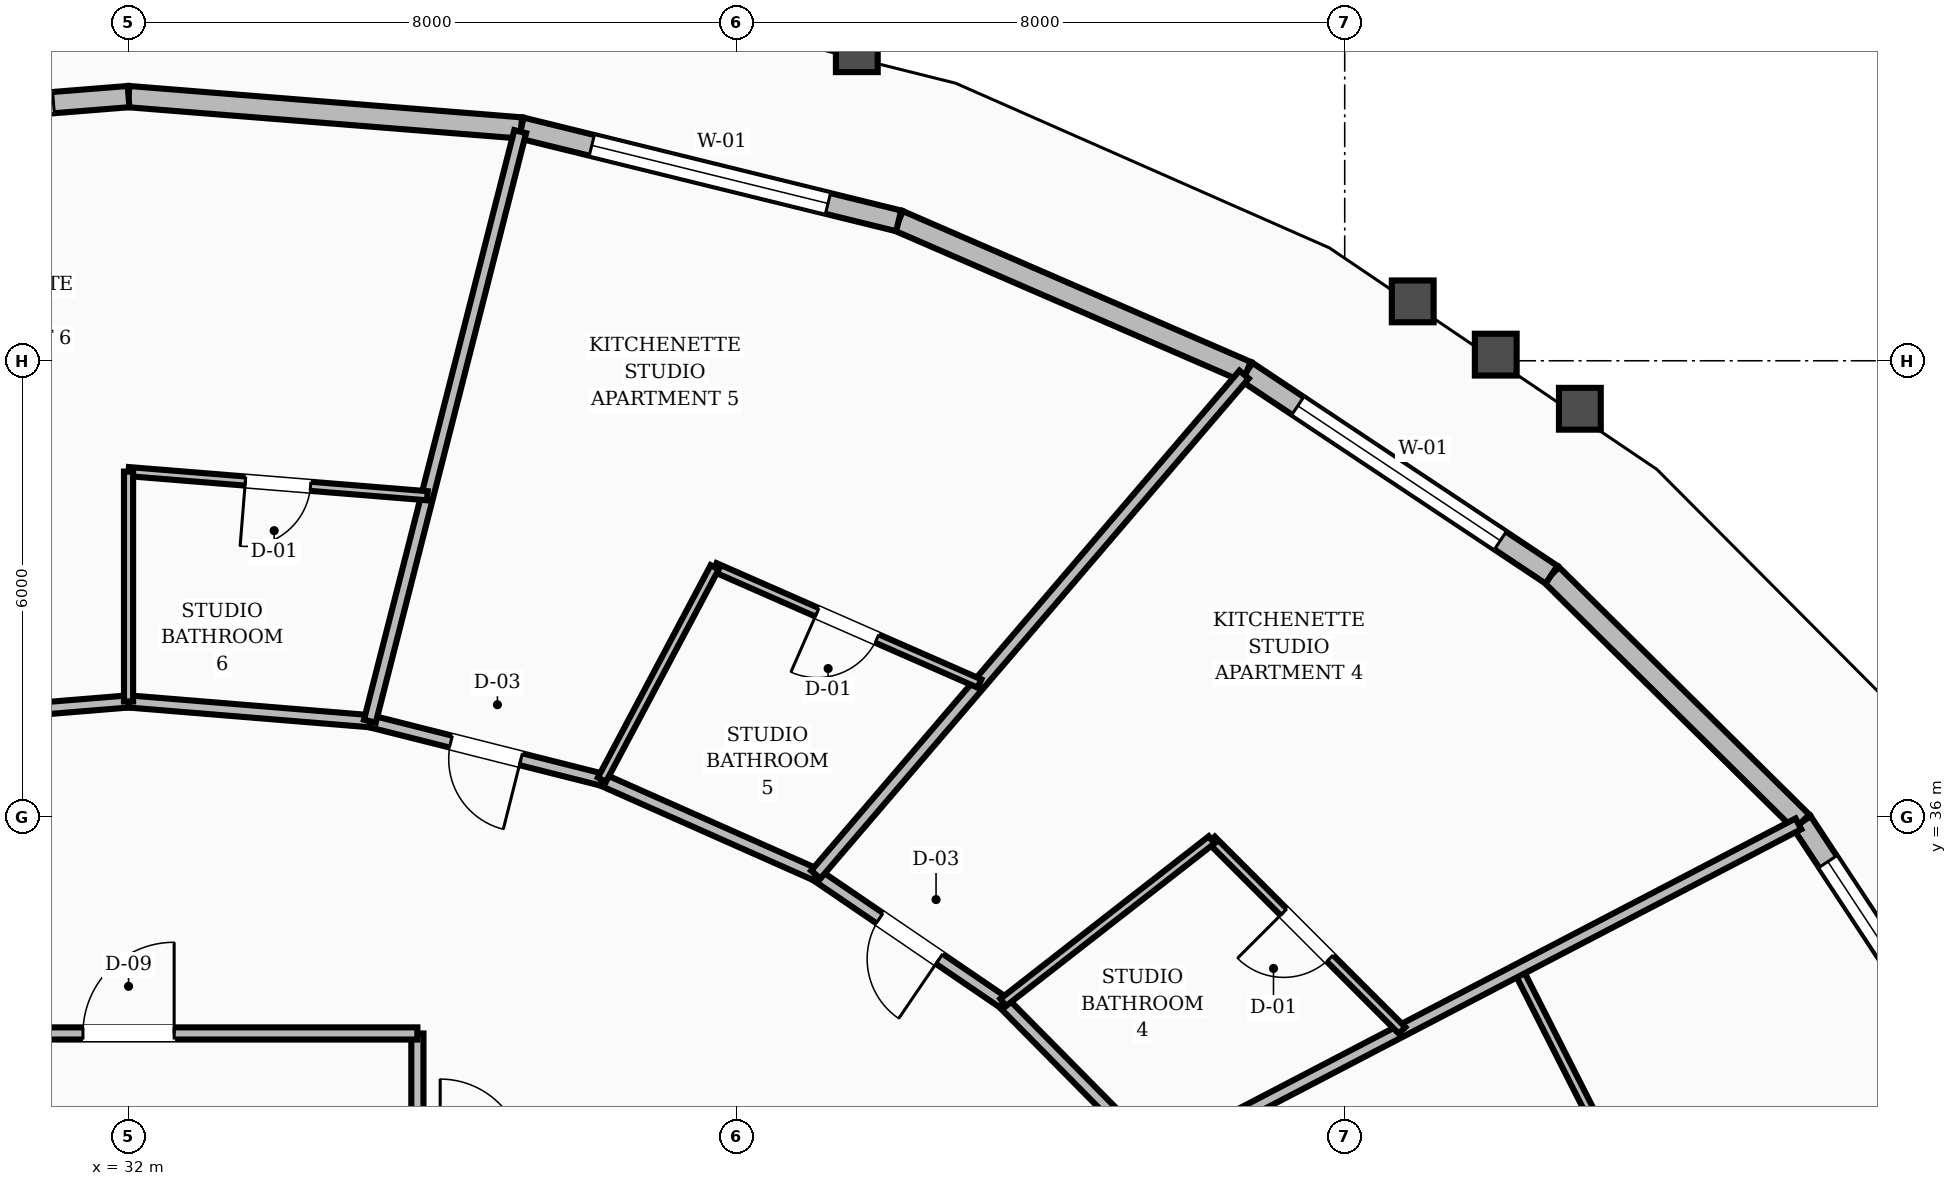
"""IFC4 building model, lengths in metres.
Left out: names, types, materials, properties, quantities, classifications, styles, units other than length and angle.
Written with IfcOpenShell. Run it as: python <this file> out.ifc"""

import sys

from ifc_helpers import new_model, si_unit, direction, frame, frame_2d, origin, place, context, subcontext, project, spatial, rectangle, extrude, element, fill, save


model = new_model("IFC4")
c1 = context("Model", 3, precision=1e-05, world=origin(), true_north=direction((0.0, 1.0)))
c2 = subcontext(c1, "Body", "Model", "MODEL_VIEW")
j1 = project(units=[si_unit("LENGTHUNIT", "METRE"), si_unit("PLANEANGLEUNIT", "RADIAN")], contexts=[c1])
p1 = place(None, origin())
s1 = spatial("IfcSite", under=j1, at=p1, CompositionType="ELEMENT")
p2 = place(p1, origin())
s2 = spatial("IfcBuilding", under=s1, at=p2, CompositionType="ELEMENT")
p3 = place(p2, frame((0.0, 0.0, 52.0)))
s3 = spatial("IfcBuildingStorey", under=s2, at=p3, CompositionType="ELEMENT", Elevation=52.0)
p4 = place(p3, frame((56.46, 32.218, 0.0), z_axis=(0.0, 0.0, 1.0), x_axis=(-0.550282912527, 0.834978272879, 0.0)))
e1 = element("IfcWall", 1, at=p4, inside=s3, PredefinedType="STANDARD", context=c2, shape_type="SweptSolid", body=[
    extrude(rectangle(XDim=4.446, YDim=0.28, at=frame_2d((2.223, 0.0))), origin(), (0.0, 0.0, 1.0), 2.65),
])
p5 = place(p4, frame((0.623, 0.0, 0.8)))
e2 = element("IfcOpeningElement", 2, at=p5, cuts=e1, PredefinedType="OPENING", context=c2, shape_type="SweptSolid", body=[
    extrude(rectangle(XDim=3.2, YDim=1.65, at=frame_2d((1.6, 0.825))), frame((0.0, 0.15, 0.0), z_axis=(0.0, -1.0, 0.0), x_axis=(1.0, 0.0, 0.0)), (0.0, 0.0, 1.0), 0.3),
])
p6 = place(p3, frame((54.013, 35.931, 0.0), z_axis=(0.0, 0.0, 1.0), x_axis=(-0.711208285642, 0.702981347146, 0.0)))
e3 = element("IfcWall", 3, at=p6, inside=s3, PredefinedType="STANDARD", context=c2, shape_type="SweptSolid", body=[
    extrude(rectangle(XDim=4.629, YDim=0.28, at=frame_2d((2.315, 0.0))), origin(), (0.0, 0.0, 1.0), 2.65),
])
p7 = place(p3, frame((50.721, 39.185, 0.0), z_axis=(0.0, 0.0, 1.0), x_axis=(-0.832431966359, 0.554127261, 0.0)))
e4 = element("IfcWall", 4, at=p7, inside=s3, PredefinedType="STANDARD", context=c2, shape_type="SweptSolid", body=[
    extrude(rectangle(XDim=4.82, YDim=0.28, at=frame_2d((2.41, 0.0))), origin(), (0.0, 0.0, 1.0), 2.65),
])
p8 = place(p7, frame((0.81, 0.0, 0.8)))
e5 = element("IfcOpeningElement", 5, at=p8, cuts=e4, PredefinedType="OPENING", context=c2, shape_type="SweptSolid", body=[
    extrude(rectangle(XDim=3.2, YDim=1.65, at=frame_2d((1.6, 0.825))), frame((0.0, 0.15, 0.0), z_axis=(0.0, -1.0, 0.0), x_axis=(1.0, 0.0, 0.0)), (0.0, 0.0, 1.0), 0.3),
])
p9 = place(p3, frame((46.709, 41.856, 0.0), z_axis=(0.0, 0.0, 1.0), x_axis=(-0.917468716398, 0.397807936612, 0.0)))
e6 = element("IfcWall", 6, at=p9, inside=s3, PredefinedType="STANDARD", context=c2, shape_type="SweptSolid", body=[
    extrude(rectangle(XDim=4.989, YDim=0.28, at=frame_2d((2.494, 0.0))), origin(), (0.0, 0.0, 1.0), 2.65),
])
p10 = place(p3, frame((42.132, 43.841, 0.0), z_axis=(0.0, 0.0, 1.0), x_axis=(-0.971042653892, 0.238906183096, 0.0)))
e7 = element("IfcWall", 7, at=p10, inside=s3, PredefinedType="STANDARD", context=c2, shape_type="SweptSolid", body=[
    extrude(rectangle(XDim=5.115, YDim=0.28, at=frame_2d((2.557, 0.0))), origin(), (0.0, 0.0, 1.0), 2.65),
])
p11 = place(p10, frame((0.957, 0.0, 0.8)))
e8 = element("IfcOpeningElement", 8, at=p11, cuts=e7, PredefinedType="OPENING", context=c2, shape_type="SweptSolid", body=[
    extrude(rectangle(XDim=3.2, YDim=1.65, at=frame_2d((1.6, 0.825))), frame((0.0, 0.15, 0.0), z_axis=(0.0, -1.0, 0.0), x_axis=(1.0, 0.0, 0.0)), (0.0, 0.0, 1.0), 0.3),
])
p12 = place(p3, frame((37.165, 45.062, 0.0), z_axis=(0.0, 0.0, 1.0), x_axis=(-0.996824560501, 0.079629112651, 0.0)))
e9 = element("IfcWall", 9, at=p12, inside=s3, PredefinedType="STANDARD", context=c2, shape_type="SweptSolid", body=[
    extrude(rectangle(XDim=5.181, YDim=0.28, at=frame_2d((2.591, 0.0))), origin(), (0.0, 0.0, 1.0), 2.65),
])
p13 = place(p3, frame((32.0, 45.475, 0.0), z_axis=(0.0, 0.0, 1.0), x_axis=(-0.996824560501, -0.079629112651, 0.0)))
e10 = element("IfcWall", 10, at=p13, inside=s3, PredefinedType="STANDARD", context=c2, shape_type="SweptSolid", body=[
    extrude(rectangle(XDim=5.181, YDim=0.28, at=frame_2d((2.591, 0.0))), origin(), (0.0, 0.0, 1.0), 2.65),
])
p14 = place(p13, frame((0.991, 0.0, 0.8)))
e11 = element("IfcOpeningElement", 11, at=p14, cuts=e10, PredefinedType="OPENING", context=c2, shape_type="SweptSolid", body=[
    extrude(rectangle(XDim=3.2, YDim=1.65, at=frame_2d((1.6, 0.825))), frame((0.0, 0.15, 0.0), z_axis=(0.0, -1.0, 0.0), x_axis=(1.0, 0.0, 0.0)), (0.0, 0.0, 1.0), 0.3),
])
p15 = place(p3, frame((35.8, 31.45, 0.0), z_axis=(0.0, 0.0, 1.0), x_axis=(0.0, 1.0, 0.0)))
e12 = element("IfcWall", 12, at=p15, inside=s3, PredefinedType="SOLIDWALL", context=c2, shape_type="SweptSolid", body=[
    extrude(rectangle(XDim=1.7, YDim=0.16, at=frame_2d((0.85, 0.0))), origin(), (0.0, 0.0, 1.0), 2.61),
])
p16 = place(p3, frame((28.2, 33.15, 0.0), z_axis=(0.0, 0.0, 1.0), x_axis=(1.0, 0.0, 0.0)))
e13 = element("IfcWall", 13, at=p16, inside=s3, PredefinedType="SOLIDWALL", context=c2, shape_type="SweptSolid", body=[
    extrude(rectangle(XDim=7.6, YDim=0.16, at=frame_2d((3.8, 0.0))), origin(), (0.0, 0.0, 1.0), 2.61),
])
p17 = place(p16, frame((3.2, 0.0, 0.0)))
e14 = element("IfcOpeningElement", 14, at=p17, cuts=e13, PredefinedType="OPENING", context=c2, shape_type="SweptSolid", body=[
    extrude(rectangle(XDim=1.2, YDim=2.1, at=frame_2d((0.6, 1.05))), frame((0.0, 0.09, 0.0), z_axis=(0.0, -1.0, 0.0), x_axis=(1.0, 0.0, 0.0)), (0.0, 0.0, 1.0), 0.18),
])
p18 = place(p3, frame((45.531, 31.51, 0.0), z_axis=(0.0, 0.0, 1.0), x_axis=(-0.702811997, 0.711375636969, 0.0)))
e15 = element("IfcWall", 15, at=p18, inside=s3, PredefinedType="SOLIDWALL", context=c2, shape_type="SweptSolid", body=[
    extrude(rectangle(XDim=2.879, YDim=0.16, at=frame_2d((1.44, 0.0))), origin(), (0.0, 0.0, 1.0), 2.61),
])
p19 = place(p3, frame((43.508, 33.559, 0.0), z_axis=(0.0, 0.0, 1.0), x_axis=(-0.826293096206, 0.56324037423, 0.0)))
e16 = element("IfcWall", 16, at=p19, inside=s3, PredefinedType="SOLIDWALL", context=c2, shape_type="SweptSolid", body=[
    extrude(rectangle(XDim=2.985, YDim=0.16, at=frame_2d((1.492, 0.0))), origin(), (0.0, 0.0, 1.0), 2.61),
])
p20 = place(p19, frame((1.017, 0.0, 0.0)))
e17 = element("IfcOpeningElement", 17, at=p20, cuts=e16, PredefinedType="OPENING", context=c2, shape_type="SweptSolid", body=[
    extrude(rectangle(XDim=0.95, YDim=2.1, at=frame_2d((0.475, 1.05))), frame((0.0, 0.09, 0.0), z_axis=(0.0, -1.0, 0.0), x_axis=(1.0, 0.0, 0.0)), (0.0, 0.0, 1.0), 0.18),
])
p21 = place(p3, frame((41.041, 35.24, 0.0), z_axis=(0.0, 0.0, 1.0), x_axis=(-0.913952123493, 0.405822024984, 0.0)))
e18 = element("IfcWall", 18, at=p21, inside=s3, PredefinedType="SOLIDWALL", context=c2, shape_type="SweptSolid", body=[
    extrude(rectangle(XDim=3.078, YDim=0.16, at=frame_2d((1.539, 0.0))), origin(), (0.0, 0.0, 1.0), 2.61),
])
p22 = place(p3, frame((38.228, 36.489, 0.0), z_axis=(0.0, 0.0, 1.0), x_axis=(-0.969689238064, 0.244341526521, 0.0)))
e19 = element("IfcWall", 19, at=p22, inside=s3, PredefinedType="SOLIDWALL", context=c2, shape_type="SweptSolid", body=[
    extrude(rectangle(XDim=3.148, YDim=0.16, at=frame_2d((1.574, 0.0))), origin(), (0.0, 0.0, 1.0), 2.61),
])
p23 = place(p22, frame((1.099, 0.0, 0.0)))
e20 = element("IfcOpeningElement", 20, at=p23, cuts=e19, PredefinedType="OPENING", context=c2, shape_type="SweptSolid", body=[
    extrude(rectangle(XDim=0.95, YDim=2.1, at=frame_2d((0.475, 1.05))), frame((0.0, 0.09, 0.0), z_axis=(0.0, -1.0, 0.0), x_axis=(1.0, 0.0, 0.0)), (0.0, 0.0, 1.0), 0.18),
])
p24 = place(p3, frame((35.175, 37.258, 0.0), z_axis=(0.0, 0.0, 1.0), x_axis=(-0.996669377538, 0.081548463373, 0.0)))
e21 = element("IfcWall", 21, at=p24, inside=s3, PredefinedType="SOLIDWALL", context=c2, shape_type="SweptSolid", body=[
    extrude(rectangle(XDim=3.185, YDim=0.16, at=frame_2d((1.593, 0.0))), origin(), (0.0, 0.0, 1.0), 2.61),
])
p25 = place(p3, frame((32.0, 37.518, 0.0), z_axis=(0.0, 0.0, 1.0), x_axis=(-0.996669377538, -0.081548463373, 0.0)))
e22 = element("IfcWall", 22, at=p25, inside=s3, PredefinedType="SOLIDWALL", context=c2, shape_type="SweptSolid", body=[
    extrude(rectangle(XDim=3.185, YDim=0.16, at=frame_2d((1.593, 0.0))), origin(), (0.0, 0.0, 1.0), 2.61),
])
p26 = place(p25, frame((1.118, 0.0, 0.0)))
e23 = element("IfcOpeningElement", 23, at=p26, cuts=e22, PredefinedType="OPENING", context=c2, shape_type="SweptSolid", body=[
    extrude(rectangle(XDim=0.95, YDim=2.1, at=frame_2d((0.475, 1.05))), frame((0.0, 0.09, 0.0), z_axis=(0.0, -1.0, 0.0), x_axis=(1.0, 0.0, 0.0)), (0.0, 0.0, 1.0), 0.18),
])
p27 = place(p3, frame((53.564, 27.507, 0.0), z_axis=(0.0, 0.0, 1.0), x_axis=(-0.451980127483, 0.892028006489, 0.0)))
e24 = element("IfcWall", 24, at=p27, inside=s3, PredefinedType="PARTITIONING", context=c2, shape_type="SweptSolid", body=[
    extrude(rectangle(XDim=7.263, YDim=0.12, at=frame_2d((3.632, 0.0))), origin(), (0.0, 0.0, 1.0), 2.61),
])
p28 = place(p27, frame((3.157, 0.0, 0.0)))
e25 = element("IfcOpeningElement", 25, at=p28, cuts=e24, PredefinedType="OPENING", context=c2, shape_type="SweptSolid", body=[
    extrude(rectangle(XDim=0.95, YDim=2.1, at=frame_2d((0.475, 1.05))), frame((0.0, 0.07, 0.0), z_axis=(0.0, -1.0, 0.0), x_axis=(1.0, 0.0, 0.0)), (0.0, 0.0, 1.0), 0.14),
])
p29 = place(p3, frame((45.531, 31.51, 0.0), z_axis=(0.0, 0.0, 1.0), x_axis=(0.886782865133, 0.462186272088, 0.0)))
e26 = element("IfcWall", 26, at=p29, inside=s3, PredefinedType="SOLIDWALL", context=c2, shape_type="SweptSolid", body=[
    extrude(rectangle(XDim=9.515, YDim=0.16, at=frame_2d((4.757, 0.0))), origin(), (0.0, 0.0, 1.0), 2.61),
])
p30 = place(p3, frame((48.754, 33.19, 0.0), z_axis=(0.0, 0.0, 1.0), x_axis=(-0.707003450842, 0.707210096434, 0.0)))
e27 = element("IfcWall", 27, at=p30, inside=s3, PredefinedType="PARTITIONING", context=c2, shape_type="SweptSolid", body=[
    extrude(rectangle(XDim=3.544, YDim=0.12, at=frame_2d((1.772, 0.0))), origin(), (0.0, 0.0, 1.0), 2.61),
])
p31 = place(p30, frame((1.342, 0.0, 0.0)))
e28 = element("IfcOpeningElement", 28, at=p31, cuts=e27, PredefinedType="OPENING", context=c2, shape_type="SweptSolid", body=[
    extrude(rectangle(XDim=0.86, YDim=2.1, at=frame_2d((0.43, 1.05))), frame((0.0, 0.07, 0.0), z_axis=(0.0, -1.0, 0.0), x_axis=(1.0, 0.0, 0.0)), (0.0, 0.0, 1.0), 0.14),
])
p32 = place(p3, frame((43.508, 33.559, 0.0), z_axis=(0.0, 0.0, 1.0), x_axis=(0.788470290208, 0.615072842401, 0.0)))
e29 = element("IfcWall", 29, at=p32, inside=s3, PredefinedType="PARTITIONING", context=c2, shape_type="SweptSolid", body=[
    extrude(rectangle(XDim=3.476, YDim=0.12, at=frame_2d((1.738, 0.0))), origin(), (0.0, 0.0, 1.0), 2.61),
])
p33 = place(p3, frame((41.041, 35.24, 0.0), z_axis=(0.0, 0.0, 1.0), x_axis=(0.650552260828, 0.75946149075, 0.0)))
e30 = element("IfcWall", 30, at=p33, inside=s3, PredefinedType="SOLIDWALL", context=c2, shape_type="SweptSolid", body=[
    extrude(rectangle(XDim=8.662, YDim=0.16, at=frame_2d((4.331, 0.0))), origin(), (0.0, 0.0, 1.0), 2.61),
])
p34 = place(p3, frame((43.195, 37.754, 0.0), z_axis=(0.0, 0.0, 1.0), x_axis=(-0.915701633534, 0.401858828873, 0.0)))
e31 = element("IfcWall", 31, at=p34, inside=s3, PredefinedType="PARTITIONING", context=c2, shape_type="SweptSolid", body=[
    extrude(rectangle(XDim=3.804, YDim=0.12, at=frame_2d((1.902, 0.0))), origin(), (0.0, 0.0, 1.0), 2.61),
])
p35 = place(p34, frame((1.472, 0.0, 0.0)))
e32 = element("IfcOpeningElement", 32, at=p35, cuts=e31, PredefinedType="OPENING", context=c2, shape_type="SweptSolid", body=[
    extrude(rectangle(XDim=0.86, YDim=2.1, at=frame_2d((0.43, 1.05))), frame((0.0, 0.07, 0.0), z_axis=(0.0, -1.0, 0.0), x_axis=(1.0, 0.0, 0.0)), (0.0, 0.0, 1.0), 0.14),
])
p36 = place(p3, frame((38.228, 36.489, 0.0), z_axis=(0.0, 0.0, 1.0), x_axis=(0.468968986747, 0.883214633863, 0.0)))
e33 = element("IfcWall", 33, at=p36, inside=s3, PredefinedType="PARTITIONING", context=c2, shape_type="SweptSolid", body=[
    extrude(rectangle(XDim=3.163, YDim=0.12, at=frame_2d((1.582, 0.0))), origin(), (0.0, 0.0, 1.0), 2.61),
])
p37 = place(p3, frame((35.175, 37.258, 0.0), z_axis=(0.0, 0.0, 1.0), x_axis=(0.247097489617, 0.968990624632, 0.0)))
e34 = element("IfcWall", 34, at=p37, inside=s3, PredefinedType="SOLIDWALL", context=c2, shape_type="SweptSolid", body=[
    extrude(rectangle(XDim=8.004, YDim=0.16, at=frame_2d((4.002, 0.0))), origin(), (0.0, 0.0, 1.0), 2.61),
])
p38 = place(p3, frame((35.931, 40.224, 0.0), z_axis=(0.0, 0.0, 1.0), x_axis=(-0.996746812946, 0.080596469411, 0.0)))
e35 = element("IfcWall", 35, at=p38, inside=s3, PredefinedType="PARTITIONING", context=c2, shape_type="SweptSolid", body=[
    extrude(rectangle(XDim=3.944, YDim=0.12, at=frame_2d((1.972, 0.0))), origin(), (0.0, 0.0, 1.0), 2.61),
])
p39 = place(p38, frame((1.542, 0.0, 0.0)))
e36 = element("IfcOpeningElement", 36, at=p39, cuts=e35, PredefinedType="OPENING", context=c2, shape_type="SweptSolid", body=[
    extrude(rectangle(XDim=0.86, YDim=2.1, at=frame_2d((0.43, 1.05))), frame((0.0, 0.07, 0.0), z_axis=(0.0, -1.0, 0.0), x_axis=(1.0, 0.0, 0.0)), (0.0, 0.0, 1.0), 0.14),
])
p40 = place(p3, frame((32.0, 37.518, 0.0), z_axis=(0.0, 0.0, 1.0), x_axis=(0.0, 1.0, 0.0)))
e37 = element("IfcWall", 37, at=p40, inside=s3, PredefinedType="PARTITIONING", context=c2, shape_type="SweptSolid", body=[
    extrude(rectangle(XDim=3.024, YDim=0.12, at=frame_2d((1.512, 0.0))), origin(), (0.0, 0.0, 1.0), 2.61),
])
p41 = place(p5, origin())
e38 = element("IfcWindow", 38, at=p41, inside=s3, PartitioningType="SINGLE_PANEL", PredefinedType="WINDOW", context=c2, shape_type="SweptSolid", body=[
    extrude(rectangle(XDim=3.2, YDim=1.65, at=frame_2d((1.6, 0.825))), frame((0.0, 0.03, 0.0), z_axis=(0.0, -1.0, 0.0), x_axis=(1.0, 0.0, 0.0)), (0.0, 0.0, 1.0), 0.06),
])
fill(e2, e38)
p42 = place(p8, origin())
e39 = element("IfcWindow", 39, at=p42, inside=s3, PartitioningType="SINGLE_PANEL", PredefinedType="WINDOW", context=c2, shape_type="SweptSolid", body=[
    extrude(rectangle(XDim=3.2, YDim=1.65, at=frame_2d((1.6, 0.825))), frame((0.0, 0.03, 0.0), z_axis=(0.0, -1.0, 0.0), x_axis=(1.0, 0.0, 0.0)), (0.0, 0.0, 1.0), 0.06),
])
fill(e5, e39)
p43 = place(p11, origin())
e40 = element("IfcWindow", 40, at=p43, inside=s3, PartitioningType="SINGLE_PANEL", PredefinedType="WINDOW", context=c2, shape_type="SweptSolid", body=[
    extrude(rectangle(XDim=3.2, YDim=1.65, at=frame_2d((1.6, 0.825))), frame((0.0, 0.03, 0.0), z_axis=(0.0, -1.0, 0.0), x_axis=(1.0, 0.0, 0.0)), (0.0, 0.0, 1.0), 0.06),
])
fill(e8, e40)
p44 = place(p14, origin())
e41 = element("IfcWindow", 41, at=p44, inside=s3, PartitioningType="SINGLE_PANEL", PredefinedType="WINDOW", context=c2, shape_type="SweptSolid", body=[
    extrude(rectangle(XDim=3.2, YDim=1.65, at=frame_2d((1.6, 0.825))), frame((0.0, 0.03, 0.0), z_axis=(0.0, -1.0, 0.0), x_axis=(1.0, 0.0, 0.0)), (0.0, 0.0, 1.0), 0.06),
])
fill(e11, e41)
p45 = place(p17, origin())
e42 = element("IfcDoor", 42, at=p45, inside=s3, OperationType="SINGLE_SWING_RIGHT", PredefinedType="DOOR", context=c2, shape_type="SweptSolid", body=[
    extrude(rectangle(XDim=1.2, YDim=2.1, at=frame_2d((0.6, 1.05))), frame((0.0, 0.025, 0.0), z_axis=(0.0, -1.0, 0.0), x_axis=(1.0, 0.0, 0.0)), (0.0, 0.0, 1.0), 0.05),
])
fill(e14, e42)
p46 = place(p31, origin())
e43 = element("IfcDoor", 43, at=p46, inside=s3, OperationType="SINGLE_SWING_RIGHT", PredefinedType="DOOR", context=c2, shape_type="SweptSolid", body=[
    extrude(rectangle(XDim=0.86, YDim=2.1, at=frame_2d((0.43, 1.05))), frame((0.0, 0.025, 0.0), z_axis=(0.0, -1.0, 0.0), x_axis=(1.0, 0.0, 0.0)), (0.0, 0.0, 1.0), 0.05),
])
fill(e28, e43)
p47 = place(p20, origin())
e44 = element("IfcDoor", 44, at=p47, inside=s3, OperationType="SINGLE_SWING_LEFT", PredefinedType="DOOR", context=c2, shape_type="SweptSolid", body=[
    extrude(rectangle(XDim=0.95, YDim=2.1, at=frame_2d((0.475, 1.05))), frame((0.0, 0.025, 0.0), z_axis=(0.0, -1.0, 0.0), x_axis=(1.0, 0.0, 0.0)), (0.0, 0.0, 1.0), 0.05),
])
fill(e17, e44)
p48 = place(p35, origin())
e45 = element("IfcDoor", 45, at=p48, inside=s3, OperationType="SINGLE_SWING_RIGHT", PredefinedType="DOOR", context=c2, shape_type="SweptSolid", body=[
    extrude(rectangle(XDim=0.86, YDim=2.1, at=frame_2d((0.43, 1.05))), frame((0.0, 0.025, 0.0), z_axis=(0.0, -1.0, 0.0), x_axis=(1.0, 0.0, 0.0)), (0.0, 0.0, 1.0), 0.05),
])
fill(e32, e45)
p49 = place(p23, origin())
e46 = element("IfcDoor", 46, at=p49, inside=s3, OperationType="SINGLE_SWING_LEFT", PredefinedType="DOOR", context=c2, shape_type="SweptSolid", body=[
    extrude(rectangle(XDim=0.95, YDim=2.1, at=frame_2d((0.475, 1.05))), frame((0.0, 0.025, 0.0), z_axis=(0.0, -1.0, 0.0), x_axis=(1.0, 0.0, 0.0)), (0.0, 0.0, 1.0), 0.05),
])
fill(e20, e46)
p50 = place(p39, origin())
e47 = element("IfcDoor", 47, at=p50, inside=s3, OperationType="SINGLE_SWING_RIGHT", PredefinedType="DOOR", context=c2, shape_type="SweptSolid", body=[
    extrude(rectangle(XDim=0.86, YDim=2.1, at=frame_2d((0.43, 1.05))), frame((0.0, 0.025, 0.0), z_axis=(0.0, -1.0, 0.0), x_axis=(1.0, 0.0, 0.0)), (0.0, 0.0, 1.0), 0.05),
])
fill(e36, e47)
save(model, sys.argv[1])
